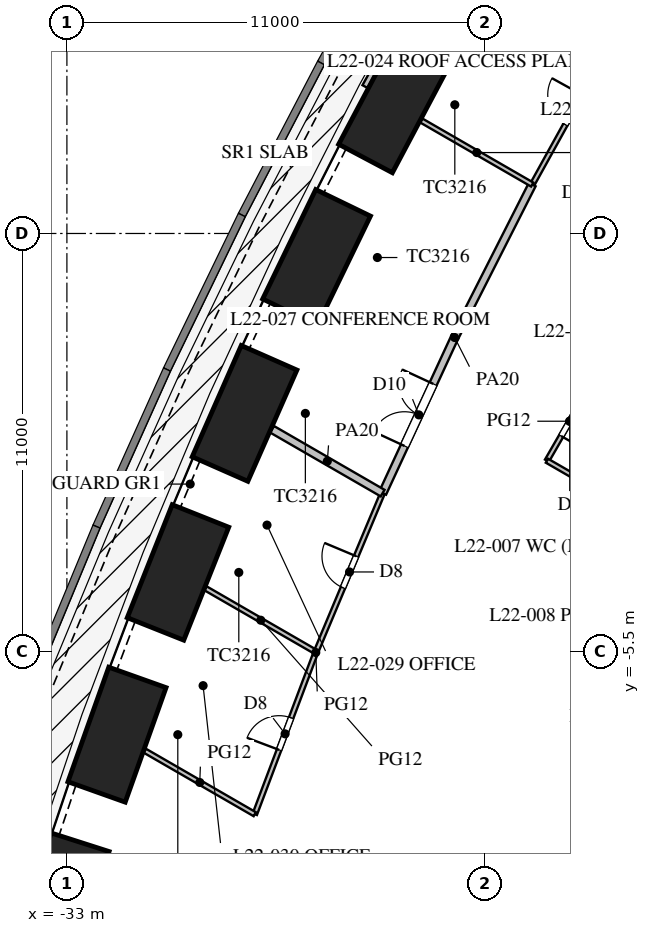
"""IFC4 building model, lengths in metres.
Left out: names, types, materials, properties, quantities, classifications, styles, units other than length and angle.
Written with IfcOpenShell. Run it as: python <this file> out.ifc"""

import sys

from ifc_helpers import new_model, si_unit, direction, frame, frame_2d, origin, origin_2d, place, context, subcontext, project, spatial, rectangle, extrude, element, fill, save


model = new_model("IFC4")
c1 = context("Model", 3, precision=1e-05, world=origin(), true_north=direction((0.0, 1.0)))
c2 = subcontext(c1, "Body", "Model", "MODEL_VIEW")
j1 = project(units=[si_unit("LENGTHUNIT", "METRE"), si_unit("PLANEANGLEUNIT", "RADIAN")], contexts=[c1])
p1 = place(None, origin())
s1 = spatial("IfcSite", under=j1, at=p1, CompositionType="ELEMENT")
p2 = place(p1, origin())
s2 = spatial("IfcBuilding", under=s1, at=p2, CompositionType="ELEMENT")
p3 = place(p2, frame((0.0, 0.0, 98.1)))
s3 = spatial("IfcBuildingStorey", under=s2, at=p3, CompositionType="ELEMENT", Elevation=98.1)
for number, where, z_axis, x_axis in (
    (1, (-24.393, 8.887, 0.0), (0.0, 0.0, 1.0), (-0.468, -0.883, 0.0)),
    (2, (-26.43, 4.867, 0.0), (0.0, 0.0, 1.0), (-0.436, -0.9, 0.0)),
    (3, (-28.325, 0.765, 0.0), (0.0, 0.0, 1.0), (-0.403, -0.915, 0.0)),
    (4, (-30.077, -3.42, 0.0), (0.0, 0.0, 1.0), (-0.37, -0.929, 0.0)),
    (5, (-31.682, -7.689, 0.0), (0.0, 0.0, 1.0), (-0.336, -0.942, 0.0)),
    (6, (-33.139, -12.044, 0.0), (0.0, 0.0, 1.0), (-0.305, -0.952, 0.0)),
):
    element("IfcColumn", number, at=place(p3, frame(where, z_axis=z_axis, x_axis=x_axis)), inside=s3, PredefinedType="COLUMN", context=c2, shape_type="SweptSolid", body=[
        extrude(rectangle(XDim=3.2, YDim=1.6, at=origin_2d()), origin(), (0.0, 0.0, 1.0), 5.0),
    ])
p4 = place(p3, frame((-23.923, 13.812, 0.0), z_axis=(0.0, 0.0, 1.0), x_axis=(-0.487373854787, -0.873193406795, 0.0)))
e7 = element("IfcWall", 7, at=p4, inside=s3, PredefinedType="PARAPET", context=c2, shape_type="SweptSolid", body=[
    extrude(rectangle(XDim=4.5, YDim=0.25, at=frame_2d((2.25, 0.0))), origin(), (0.0, 0.0, 1.0), 1.1),
])
p5 = place(p3, frame((-26.116, 9.882, 0.0), z_axis=(0.0, 0.0, 1.0), x_axis=(-0.461852697957, -0.886956642339, 0.0)))
e8 = element("IfcWall", 8, at=p5, inside=s3, PredefinedType="PARAPET", context=c2, shape_type="SweptSolid", body=[
    extrude(rectangle(XDim=4.504, YDim=0.25, at=frame_2d((2.252, 0.0))), origin(), (0.0, 0.0, 1.0), 1.1),
])
p6 = place(p3, frame((-28.197, 5.887, 0.0), z_axis=(0.0, 0.0, 1.0), x_axis=(-0.435857917556, -0.900015486369, 0.0)))
e9 = element("IfcWall", 9, at=p6, inside=s3, PredefinedType="PARAPET", context=c2, shape_type="SweptSolid", body=[
    extrude(rectangle(XDim=4.512, YDim=0.25, at=frame_2d((2.256, 0.0))), origin(), (0.0, 0.0, 1.0), 1.1),
])
p7 = place(p3, frame((-30.163, 1.826, 0.0), z_axis=(0.0, 0.0, 1.0), x_axis=(-0.409451055745, -0.912332084796, 0.0)))
e10 = element("IfcWall", 10, at=p7, inside=s3, PredefinedType="PARAPET", context=c2, shape_type="SweptSolid", body=[
    extrude(rectangle(XDim=4.523, YDim=0.25, at=frame_2d((2.262, 0.0))), origin(), (0.0, 0.0, 1.0), 1.1),
])
p8 = place(p3, frame((-32.015, -2.301, 0.0), z_axis=(0.0, 0.0, 1.0), x_axis=(-0.382639984525, -0.923897527999, 0.0)))
e11 = element("IfcWall", 11, at=p8, inside=s3, PredefinedType="PARAPET", context=c2, shape_type="SweptSolid", body=[
    extrude(rectangle(XDim=4.539, YDim=0.25, at=frame_2d((2.27, 0.0))), origin(), (0.0, 0.0, 1.0), 1.1),
])
p9 = place(p3, frame((-23.01, 13.243, 0.0), z_axis=(0.0, 0.0, 1.0), x_axis=(-0.48433245205, -0.874884035682, 0.0)))
e12 = element("IfcWall", 12, at=p9, inside=s3, PredefinedType="SOLIDWALL", context=c2, shape_type="SweptSolid", body=[
    extrude(rectangle(XDim=4.431, YDim=0.15, at=frame_2d((2.215, 0.0))), origin(), (0.0, 0.0, 1.0), 4.98),
])
p10 = place(p9, frame((1.715, 0.0, 0.0)))
e13 = element("IfcOpeningElement", 13, at=p10, cuts=e12, PredefinedType="OPENING", context=c2, shape_type="SweptSolid", body=[
    extrude(rectangle(XDim=1.0, YDim=2.1, at=frame_2d((0.5, 1.05))), frame((0.0, 0.085, 0.0), z_axis=(0.0, -1.0, 0.0), x_axis=(1.0, 0.0, 0.0)), (0.0, 0.0, 1.0), 0.17),
])
p11 = place(p3, frame((-14.203, -8.2, 0.0), z_axis=(0.0, 0.0, 1.0), x_axis=(-0.866024668836, -0.500001272966, 0.0)))
e14 = element("IfcWall", 14, at=p11, inside=s3, PredefinedType="PARTITIONING", context=c2, shape_type="SweptSolid", body=[
    extrude(rectangle(XDim=16.65, YDim=0.15, at=frame_2d((8.325, 0.0))), origin(), (0.0, 0.0, 1.0), 3.1),
])
p12 = place(p3, frame((-19.169, 1.599, 0.0), z_axis=(0.0, 0.0, 1.0), x_axis=(-0.499957262057, -0.866050077142, 0.0)))
e15 = element("IfcWall", 15, at=p12, inside=s3, PredefinedType="PARTITIONING", context=c2, shape_type="SweptSolid", body=[
    extrude(rectangle(XDim=2.4, YDim=0.12, at=frame_2d((1.2, 0.0))), origin(), (0.0, 0.0, 1.0), 3.6),
])
p13 = place(p12, frame((0.75, 0.0, 0.0)))
e16 = element("IfcOpeningElement", 16, at=p13, cuts=e15, PredefinedType="OPENING", context=c2, shape_type="SweptSolid", body=[
    extrude(rectangle(XDim=0.9, YDim=2.1, at=frame_2d((0.45, 1.05))), frame((0.0, 0.07, 0.0), z_axis=(0.0, -1.0, 0.0), x_axis=(1.0, 0.0, 0.0)), (0.0, 0.0, 1.0), 0.14),
])
p14 = place(p3, frame((-16.905, -2.48, 0.0), z_axis=(0.0, 0.0, 1.0), x_axis=(-0.866026010844, 0.49999894854, 0.0)))
e17 = element("IfcWall", 17, at=p14, inside=s3, PredefinedType="PARTITIONING", context=c2, shape_type="SweptSolid", body=[
    extrude(rectangle(XDim=4.0, YDim=0.12, at=frame_2d((2.0, 0.0))), origin(), (0.0, 0.0, 1.0), 3.6),
])
p15 = place(p3, frame((-18.576, 10.725, 0.0), z_axis=(0.0, 0.0, 1.0), x_axis=(-0.484292898211, -0.874905931368, 0.0)))
e18 = element("IfcWall", 18, at=p15, inside=s3, PredefinedType="PARTITIONING", context=c2, shape_type="SweptSolid", body=[
    extrude(rectangle(XDim=4.501, YDim=0.12, at=frame_2d((2.25, 0.0))), origin(), (0.0, 0.0, 1.0), 3.6),
])
p16 = place(p15, frame((1.8, 0.0, 0.0)))
e19 = element("IfcOpeningElement", 19, at=p16, cuts=e18, PredefinedType="OPENING", context=c2, shape_type="SweptSolid", body=[
    extrude(rectangle(XDim=0.9, YDim=2.1, at=frame_2d((0.45, 1.05))), frame((0.0, 0.07, 0.0), z_axis=(0.0, -1.0, 0.0), x_axis=(1.0, 0.0, 0.0)), (0.0, 0.0, 1.0), 0.14),
])
p17 = place(p3, frame((-24.692, -1.333, 0.0), z_axis=(0.0, 0.0, 1.0), x_axis=(-0.386762112496, -0.922179520667, 0.0)))
e20 = element("IfcWall", 20, at=p17, inside=s3, PredefinedType="PARTITIONING", context=c2, shape_type="SweptSolid", body=[
    extrude(rectangle(XDim=4.536, YDim=0.12, at=frame_2d((2.268, 0.0))), origin(), (0.0, 0.0, 1.0), 3.6),
])
p18 = place(p17, frame((1.8, 0.0, 0.0)))
e21 = element("IfcOpeningElement", 21, at=p18, cuts=e20, PredefinedType="OPENING", context=c2, shape_type="SweptSolid", body=[
    extrude(rectangle(XDim=0.9, YDim=2.1, at=frame_2d((0.45, 1.05))), frame((0.0, 0.07, 0.0), z_axis=(0.0, -1.0, 0.0), x_axis=(1.0, 0.0, 0.0)), (0.0, 0.0, 1.0), 0.14),
])
p19 = place(p3, frame((-26.447, -5.516, 0.0), z_axis=(0.0, 0.0, 1.0), x_axis=(-0.352894560512, -0.93566309597, 0.0)))
e22 = element("IfcWall", 22, at=p19, inside=s3, PredefinedType="PARTITIONING", context=c2, shape_type="SweptSolid", body=[
    extrude(rectangle(XDim=4.561, YDim=0.12, at=frame_2d((2.28, 0.0))), origin(), (0.0, 0.0, 1.0), 3.6),
])
p20 = place(p19, frame((1.85, 0.0, 0.0)))
e23 = element("IfcOpeningElement", 23, at=p20, cuts=e22, PredefinedType="OPENING", context=c2, shape_type="SweptSolid", body=[
    extrude(rectangle(XDim=0.9, YDim=2.1, at=frame_2d((0.45, 1.05))), frame((0.0, 0.07, 0.0), z_axis=(0.0, -1.0, 0.0), x_axis=(1.0, 0.0, 0.0)), (0.0, 0.0, 1.0), 0.14),
])
p21 = place(p3, frame((-20.756, 6.787, 0.0), z_axis=(0.0, 0.0, 1.0), x_axis=(-0.452471679136, -0.891778772779, 0.0)))
e24 = element("IfcWall", 24, at=p21, inside=s3, PredefinedType="PARTITIONING", context=c2, shape_type="SweptSolid", body=[
    extrude(rectangle(XDim=4.507, YDim=0.2, at=frame_2d((2.253, 0.0))), origin(), (0.0, 0.0, 1.0), 3.6),
])
p22 = place(p3, frame((-22.795, 2.768, 0.0), z_axis=(0.0, 0.0, 1.0), x_axis=(-0.41992827805, -0.90755729367, 0.0)))
e25 = element("IfcWall", 25, at=p22, inside=s3, PredefinedType="PARTITIONING", context=c2, shape_type="SweptSolid", body=[
    extrude(rectangle(XDim=4.519, YDim=0.2, at=frame_2d((2.259, 0.0))), origin(), (0.0, 0.0, 1.0), 3.6),
])
p23 = place(p22, frame((1.35, 0.0, 0.0)))
e26 = element("IfcOpeningElement", 26, at=p23, cuts=e25, PredefinedType="OPENING", context=c2, shape_type="SweptSolid", body=[
    extrude(rectangle(XDim=1.8, YDim=2.1, at=frame_2d((0.9, 1.05))), frame((0.0, 0.11, 0.0), z_axis=(0.0, -1.0, 0.0), x_axis=(1.0, 0.0, 0.0)), (0.0, 0.0, 1.0), 0.22),
])
p24 = place(p3, frame((-24.692, -1.333, 0.0), z_axis=(0.0, 0.0, 1.0), x_axis=(-0.866025882247, 0.499999171277, 0.0)))
e27 = element("IfcWall", 27, at=p24, inside=s3, PredefinedType="PARTITIONING", context=c2, shape_type="SweptSolid", body=[
    extrude(rectangle(XDim=3.36, YDim=0.2, at=frame_2d((1.68, 0.0))), origin(), (0.0, 0.0, 1.0), 3.0),
])
p25 = place(p3, frame((-26.447, -5.516, 0.0), z_axis=(0.0, 0.0, 1.0), x_axis=(-0.866025533106, 0.499999776008, 0.0)))
e28 = element("IfcWall", 28, at=p25, inside=s3, PredefinedType="PARTITIONING", context=c2, shape_type="SweptSolid", body=[
    extrude(rectangle(XDim=3.353, YDim=0.12, at=frame_2d((1.677, 0.0))), origin(), (0.0, 0.0, 1.0), 3.2),
])
p26 = place(p3, frame((-28.056, -9.783, 0.0), z_axis=(0.0, 0.0, 1.0), x_axis=(-0.866018979599, 0.50001112685, 0.0)))
e29 = element("IfcWall", 29, at=p26, inside=s3, PredefinedType="PARTITIONING", context=c2, shape_type="SweptSolid", body=[
    extrude(rectangle(XDim=3.343, YDim=0.12, at=frame_2d((1.672, 0.0))), origin(), (0.0, 0.0, 1.0), 3.4),
])
p27 = place(p3, frame((-20.756, 6.787, 0.0), z_axis=(0.0, 0.0, 1.0), x_axis=(-0.866022675988, 0.500004724652, 0.0)))
e30 = element("IfcWall", 30, at=p27, inside=s3, PredefinedType="PARTITIONING", context=c2, shape_type="SweptSolid", body=[
    extrude(rectangle(XDim=3.369, YDim=0.12, at=frame_2d((1.685, 0.0))), origin(), (0.0, 0.0, 1.0), 3.2),
])
p28 = place(p13, origin())
e31 = element("IfcDoor", 31, at=p28, inside=s3, OperationType="SINGLE_SWING_RIGHT", PredefinedType="DOOR", context=c2, shape_type="SweptSolid", body=[
    extrude(rectangle(XDim=0.9, YDim=2.1, at=frame_2d((0.45, 1.05))), frame((0.0, 0.025, 0.0), z_axis=(0.0, -1.0, 0.0), x_axis=(1.0, 0.0, 0.0)), (0.0, 0.0, 1.0), 0.05),
])
fill(e16, e31)
p29 = place(p16, frame((0.9, 0.0, 0.0), z_axis=(0.0, 0.0, 1.0), x_axis=(-1.0, 0.0, 0.0)))
e32 = element("IfcDoor", 32, at=p29, inside=s3, OperationType="SINGLE_SWING_RIGHT", PredefinedType="DOOR", context=c2, shape_type="SweptSolid", body=[
    extrude(rectangle(XDim=0.9, YDim=2.1, at=frame_2d((0.45, 1.05))), frame((0.0, 0.025, 0.0), z_axis=(0.0, -1.0, 0.0), x_axis=(1.0, 0.0, 0.0)), (0.0, 0.0, 1.0), 0.05),
])
fill(e19, e32)
p30 = place(p23, frame((1.8, 0.0, 0.0), z_axis=(0.0, 0.0, 1.0), x_axis=(-1.0, 0.0, 0.0)))
e33 = element("IfcDoor", 33, at=p30, inside=s3, OperationType="DOUBLE_DOOR_SINGLE_SWING", PredefinedType="DOOR", context=c2, shape_type="SweptSolid", body=[
    extrude(rectangle(XDim=1.8, YDim=2.1, at=frame_2d((0.9, 1.05))), frame((0.0, 0.025, 0.0), z_axis=(0.0, -1.0, 0.0), x_axis=(1.0, 0.0, 0.0)), (0.0, 0.0, 1.0), 0.05),
])
fill(e26, e33)
p31 = place(p18, frame((0.9, 0.0, 0.0), z_axis=(0.0, 0.0, 1.0), x_axis=(-1.0, 0.0, 0.0)))
e34 = element("IfcDoor", 34, at=p31, inside=s3, OperationType="SINGLE_SWING_RIGHT", PredefinedType="DOOR", context=c2, shape_type="SweptSolid", body=[
    extrude(rectangle(XDim=0.9, YDim=2.1, at=frame_2d((0.45, 1.05))), frame((0.0, 0.025, 0.0), z_axis=(0.0, -1.0, 0.0), x_axis=(1.0, 0.0, 0.0)), (0.0, 0.0, 1.0), 0.05),
])
fill(e21, e34)
p32 = place(p20, frame((0.9, 0.0, 0.0), z_axis=(0.0, 0.0, 1.0), x_axis=(-1.0, 0.0, 0.0)))
e35 = element("IfcDoor", 35, at=p32, inside=s3, OperationType="SINGLE_SWING_LEFT", PredefinedType="DOOR", context=c2, shape_type="SweptSolid", body=[
    extrude(rectangle(XDim=0.9, YDim=2.1, at=frame_2d((0.45, 1.05))), frame((0.0, 0.025, 0.0), z_axis=(0.0, -1.0, 0.0), x_axis=(1.0, 0.0, 0.0)), (0.0, 0.0, 1.0), 0.05),
])
fill(e23, e35)
save(model, sys.argv[1])
